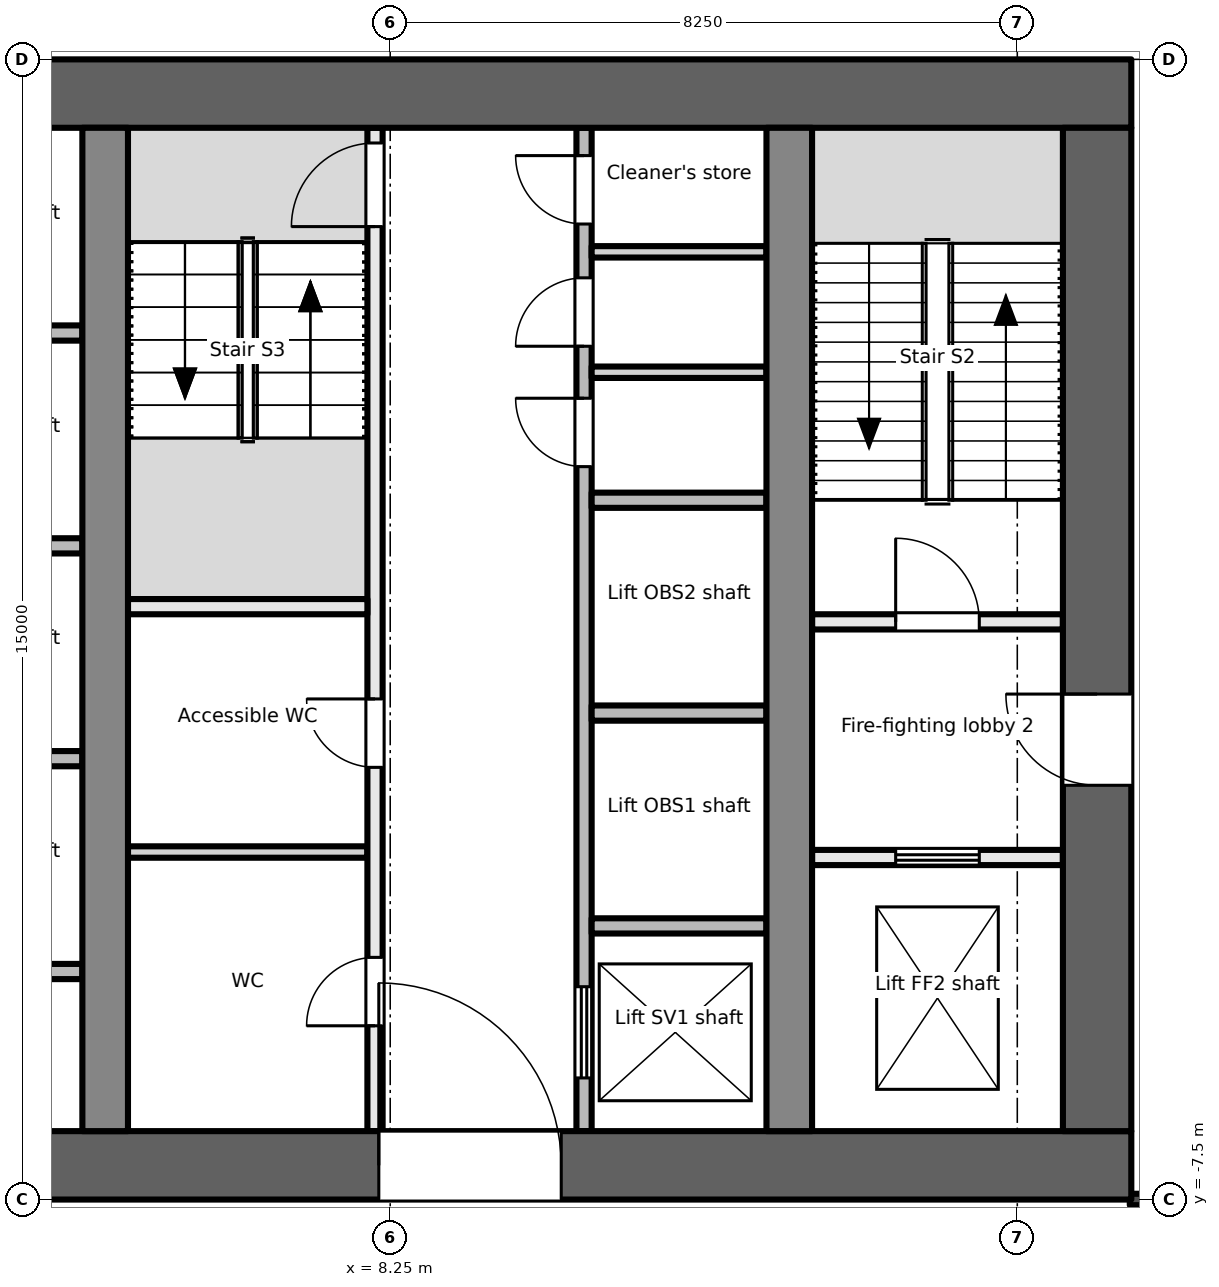
"""IFC4 building model, lengths in metres.
Left out: names, types, materials, properties, quantities, classifications, styles, units other than length and angle.
Written with IfcOpenShell. Run it as: python <this file> out.ifc"""

import sys

from ifc_helpers import new_model, si_unit, direction, frame, frame_2d, origin, place, context, subcontext, project, spatial, rectangle, extrude, element, fill, save


model = new_model("IFC4")
c1 = context("Model", 3, precision=1e-05, world=origin(), true_north=direction((0.0, 1.0)))
c2 = subcontext(c1, "Body", "Model", "MODEL_VIEW")
j1 = project(units=[si_unit("LENGTHUNIT", "METRE"), si_unit("PLANEANGLEUNIT", "RADIAN")], contexts=[c1])
p1 = place(None, origin())
s1 = spatial("IfcSite", under=j1, at=p1, CompositionType="ELEMENT")
p2 = place(p1, origin())
s2 = spatial("IfcBuilding", under=s1, at=p2, CompositionType="ELEMENT")
p3 = place(p2, frame((0.0, 0.0, 115.7)))
s3 = spatial("IfcBuildingStorey", under=s2, at=p3, CompositionType="ELEMENT", Elevation=115.7)
p4 = place(p3, frame((-18.0, -7.05, -0.2), z_axis=(0.0, 0.0, 1.0), x_axis=(1.0, 0.0, 0.0)))
e1 = element("IfcWall", 1, at=p4, inside=s3, PredefinedType="SHEAR", context=c2, shape_type="SweptSolid", body=[
    extrude(rectangle(XDim=36.0, YDim=0.9, at=frame_2d((18.0, 0.0))), origin(), (0.0, 0.0, 1.0), 5.0),
])
p5 = place(p4, frame((7.8, 0.0, 0.2)))
e2 = element("IfcOpeningElement", 2, at=p5, cuts=e1, PredefinedType="OPENING", context=c2, shape_type="SweptSolid", body=[
    extrude(rectangle(XDim=2.4, YDim=2.1, at=frame_2d((1.2, 1.05))), frame((0.0, 0.46, 0.0), z_axis=(0.0, -1.0, 0.0), x_axis=(1.0, 0.0, 0.0)), (0.0, 0.0, 1.0), 0.921),
])
p6 = place(p4, frame((17.4, 0.0, 0.2)))
e3 = element("IfcOpeningElement", 3, at=p6, cuts=e1, PredefinedType="OPENING", context=c2, shape_type="SweptSolid", body=[
    extrude(rectangle(XDim=1.2, YDim=2.1, at=frame_2d((0.6, 1.05))), frame((0.0, 0.46, 0.0), z_axis=(0.0, -1.0, 0.0), x_axis=(1.0, 0.0, 0.0)), (0.0, 0.0, 1.0), 0.921),
])
p7 = place(p4, frame((26.1, 0.0, 0.2)))
e4 = element("IfcOpeningElement", 4, at=p7, cuts=e1, PredefinedType="OPENING", context=c2, shape_type="SweptSolid", body=[
    extrude(rectangle(XDim=2.4, YDim=2.1, at=frame_2d((1.2, 1.05))), frame((0.0, 0.46, 0.0), z_axis=(0.0, -1.0, 0.0), x_axis=(1.0, 0.0, 0.0)), (0.0, 0.0, 1.0), 0.921),
])
p8 = place(p3, frame((-18.0, 7.05, -0.2), z_axis=(0.0, 0.0, 1.0), x_axis=(1.0, 0.0, 0.0)))
e5 = element("IfcWall", 5, at=p8, inside=s3, PredefinedType="SHEAR", context=c2, shape_type="SweptSolid", body=[
    extrude(rectangle(XDim=36.0, YDim=0.9, at=frame_2d((18.0, 0.0))), origin(), (0.0, 0.0, 1.0), 5.0),
])
p9 = place(p3, frame((17.55, -6.6, -0.2), z_axis=(0.0, 0.0, 1.0), x_axis=(0.0, 1.0, 0.0)))
e6 = element("IfcWall", 6, at=p9, inside=s3, PredefinedType="SHEAR", context=c2, shape_type="SweptSolid", body=[
    extrude(rectangle(XDim=13.2, YDim=0.9, at=frame_2d((6.6, 0.0))), origin(), (0.0, 0.0, 1.0), 5.0),
])
p10 = place(p9, frame((4.55, 0.0, 0.2)))
e7 = element("IfcOpeningElement", 7, at=p10, cuts=e6, PredefinedType="OPENING", context=c2, shape_type="SweptSolid", body=[
    extrude(rectangle(XDim=1.2, YDim=2.1, at=frame_2d((0.6, 1.05))), frame((0.0, 0.46, 0.0), z_axis=(0.0, -1.0, 0.0), x_axis=(1.0, 0.0, 0.0)), (0.0, 0.0, 1.0), 0.921),
])
for number, where, z_axis, x_axis in (
    (8, (4.5, -6.6, -0.2), (0.0, 0.0, 1.0), (0.0, 1.0, 0.0)),
    (9, (13.5, -6.6, -0.2), (0.0, 0.0, 1.0), (0.0, 1.0, 0.0)),
):
    element("IfcWall", number, at=place(p3, frame(where, z_axis=z_axis, x_axis=x_axis)), inside=s3, PredefinedType="SHEAR", context=c2, shape_type="SweptSolid", body=[
        extrude(rectangle(XDim=13.2, YDim=0.6, at=frame_2d((6.6, 0.0))), origin(), (0.0, 0.0, 1.0), 5.0),
    ])
p11 = place(p3, frame((13.8, -3.0, 0.0), z_axis=(0.0, 0.0, 1.0), x_axis=(1.0, 0.0, 0.0)))
e10 = element("IfcWall", 10, at=p11, inside=s3, PredefinedType="PARTITIONING", context=c2, shape_type="SweptSolid", body=[
    extrude(rectangle(XDim=3.3, YDim=0.2, at=frame_2d((1.65, 0.0))), origin(), (0.0, 0.0, 1.0), 4.8),
])
p12 = place(p11, frame((1.1, 0.0, 0.0)))
e11 = element("IfcOpeningElement", 11, at=p12, cuts=e10, PredefinedType="OPENING", context=c2, shape_type="SweptSolid", body=[
    extrude(rectangle(XDim=1.1, YDim=2.1, at=frame_2d((0.55, 1.05))), frame((0.0, 0.111, 0.0), z_axis=(0.0, -1.0, 0.0), x_axis=(1.0, 0.0, 0.0)), (0.0, 0.0, 1.0), 0.221),
])
p13 = place(p3, frame((13.8, 0.1, 0.0), z_axis=(0.0, 0.0, 1.0), x_axis=(1.0, 0.0, 0.0)))
e12 = element("IfcWall", 12, at=p13, inside=s3, PredefinedType="PARTITIONING", context=c2, shape_type="SweptSolid", body=[
    extrude(rectangle(XDim=3.3, YDim=0.2, at=frame_2d((1.65, 0.0))), origin(), (0.0, 0.0, 1.0), 4.8),
])
p14 = place(p13, frame((1.1, 0.0, 0.0)))
e13 = element("IfcOpeningElement", 13, at=p14, cuts=e12, PredefinedType="OPENING", context=c2, shape_type="SweptSolid", body=[
    extrude(rectangle(XDim=1.1, YDim=2.1, at=frame_2d((0.55, 1.05))), frame((0.0, 0.111, 0.0), z_axis=(0.0, -1.0, 0.0), x_axis=(1.0, 0.0, 0.0)), (0.0, 0.0, 1.0), 0.221),
])
for number, where, z_axis, x_axis in (
    (14, (1.9, -1.7, 0.0), (0.0, 0.0, 1.0), (1.0, 0.0, 0.0)),
    (15, (1.9, 1.1, 0.0), (0.0, 0.0, 1.0), (1.0, 0.0, 0.0)),
    (16, (1.9, 3.9, 0.0), (0.0, 0.0, 1.0), (1.0, 0.0, 0.0)),
    (17, (1.9, -4.5, 0.0), (0.0, 0.0, 1.0), (1.0, 0.0, 0.0)),
):
    element("IfcWall", number, at=place(p3, frame(where, z_axis=z_axis, x_axis=x_axis)), inside=s3, PredefinedType="PARTITIONING", context=c2, shape_type="SweptSolid", body=[
        extrude(rectangle(XDim=2.3, YDim=0.2, at=frame_2d((1.15, 0.0))), origin(), (0.0, 0.0, 1.0), 4.8),
    ])
p15 = place(p3, frame((8.05, -6.6, 0.0), z_axis=(0.0, 0.0, 1.0), x_axis=(0.0, 1.0, 0.0)))
e18 = element("IfcWall", 18, at=p15, inside=s3, PredefinedType="PARTITIONING", context=c2, shape_type="SweptSolid", body=[
    extrude(rectangle(XDim=13.2, YDim=0.2, at=frame_2d((6.6, 0.0))), origin(), (0.0, 0.0, 1.0), 4.8),
])
p16 = place(p15, frame((1.386, 0.0, 0.0)))
e19 = element("IfcOpeningElement", 19, at=p16, cuts=e18, PredefinedType="OPENING", context=c2, shape_type="SweptSolid", body=[
    extrude(rectangle(XDim=0.9, YDim=2.1, at=frame_2d((0.45, 1.05))), frame((0.0, 0.111, 0.0), z_axis=(0.0, -1.0, 0.0), x_axis=(1.0, 0.0, 0.0)), (0.0, 0.0, 1.0), 0.221),
])
p17 = place(p15, frame((4.786, 0.0, 0.0)))
e20 = element("IfcOpeningElement", 20, at=p17, cuts=e18, PredefinedType="OPENING", context=c2, shape_type="SweptSolid", body=[
    extrude(rectangle(XDim=0.9, YDim=2.1, at=frame_2d((0.45, 1.05))), frame((0.0, 0.111, 0.0), z_axis=(0.0, -1.0, 0.0), x_axis=(1.0, 0.0, 0.0)), (0.0, 0.0, 1.0), 0.221),
])
p18 = place(p15, frame((11.9, 0.0, 0.0)))
e21 = element("IfcOpeningElement", 21, at=p18, cuts=e18, PredefinedType="OPENING", context=c2, shape_type="SweptSolid", body=[
    extrude(rectangle(XDim=1.1, YDim=2.1, at=frame_2d((0.55, 1.05))), frame((0.0, 0.111, 0.0), z_axis=(0.0, -1.0, 0.0), x_axis=(1.0, 0.0, 0.0)), (0.0, 0.0, 1.0), 0.221),
])
p19 = place(p3, frame((10.8, -6.6, 0.0), z_axis=(0.0, 0.0, 1.0), x_axis=(0.0, 1.0, 0.0)))
e22 = element("IfcWall", 22, at=p19, inside=s3, PredefinedType="PARTITIONING", context=c2, shape_type="SweptSolid", body=[
    extrude(rectangle(XDim=13.2, YDim=0.2, at=frame_2d((6.6, 0.0))), origin(), (0.0, 0.0, 1.0), 4.8),
])
p20 = place(p19, frame((0.7, 0.0, 0.0)))
e23 = element("IfcOpeningElement", 23, at=p20, cuts=e22, PredefinedType="OPENING", context=c2, shape_type="SweptSolid", body=[
    extrude(rectangle(XDim=1.2, YDim=2.1, at=frame_2d((0.6, 1.05))), frame((0.0, 0.111, 0.0), z_axis=(0.0, -1.0, 0.0), x_axis=(1.0, 0.0, 0.0)), (0.0, 0.0, 1.0), 0.221),
])
p21 = place(p19, frame((8.742, 0.0, 0.0)))
e24 = element("IfcOpeningElement", 24, at=p21, cuts=e22, PredefinedType="OPENING", context=c2, shape_type="SweptSolid", body=[
    extrude(rectangle(XDim=0.9, YDim=2.1, at=frame_2d((0.45, 1.05))), frame((0.0, 0.111, 0.0), z_axis=(0.0, -1.0, 0.0), x_axis=(1.0, 0.0, 0.0)), (0.0, 0.0, 1.0), 0.221),
])
p22 = place(p19, frame((10.326, 0.0, 0.0)))
e25 = element("IfcOpeningElement", 25, at=p22, cuts=e22, PredefinedType="OPENING", context=c2, shape_type="SweptSolid", body=[
    extrude(rectangle(XDim=0.9, YDim=2.1, at=frame_2d((0.45, 1.05))), frame((0.0, 0.111, 0.0), z_axis=(0.0, -1.0, 0.0), x_axis=(1.0, 0.0, 0.0)), (0.0, 0.0, 1.0), 0.221),
])
p23 = place(p19, frame((11.934, 0.0, 0.0)))
e26 = element("IfcOpeningElement", 26, at=p23, cuts=e22, PredefinedType="OPENING", context=c2, shape_type="SweptSolid", body=[
    extrude(rectangle(XDim=0.9, YDim=2.1, at=frame_2d((0.45, 1.05))), frame((0.0, 0.111, 0.0), z_axis=(0.0, -1.0, 0.0), x_axis=(1.0, 0.0, 0.0)), (0.0, 0.0, 1.0), 0.221),
])
p24 = place(p3, frame((4.8, 0.3, 0.0), z_axis=(0.0, 0.0, 1.0), x_axis=(1.0, 0.0, 0.0)))
e27 = element("IfcWall", 27, at=p24, inside=s3, PredefinedType="PARTITIONING", context=c2, shape_type="SweptSolid", body=[
    extrude(rectangle(XDim=3.15, YDim=0.2, at=frame_2d((1.575, 0.0))), origin(), (0.0, 0.0, 1.0), 4.8),
])
p25 = place(p3, frame((4.8, -2.928, 0.0), z_axis=(0.0, 0.0, 1.0), x_axis=(1.0, 0.0, 0.0)))
e28 = element("IfcWall", 28, at=p25, inside=s3, PredefinedType="PARTITIONING", context=c2, shape_type="SweptSolid", body=[
    extrude(rectangle(XDim=3.15, YDim=0.15, at=frame_2d((1.575, 0.0))), origin(), (0.0, 0.0, 1.0), 4.8),
])
for number, where, z_axis, x_axis in (
    (29, (10.9, -3.9, 0.0), (0.0, 0.0, 1.0), (1.0, 0.0, 0.0)),
    (30, (10.9, -1.1, 0.0), (0.0, 0.0, 1.0), (1.0, 0.0, 0.0)),
    (31, (10.9, 1.7, 0.0), (0.0, 0.0, 1.0), (1.0, 0.0, 0.0)),
):
    element("IfcWall", number, at=place(p3, frame(where, z_axis=z_axis, x_axis=x_axis)), inside=s3, PredefinedType="PARTITIONING", context=c2, shape_type="SweptSolid", body=[
        extrude(rectangle(XDim=2.3, YDim=0.2, at=frame_2d((1.15, 0.0))), origin(), (0.0, 0.0, 1.0), 4.8),
    ])
for number, where, z_axis, x_axis in (
    (32, (10.9, 3.384, 0.0), (0.0, 0.0, 1.0), (1.0, 0.0, 0.0)),
    (33, (10.9, 4.968, 0.0), (0.0, 0.0, 1.0), (1.0, 0.0, 0.0)),
):
    element("IfcWall", number, at=place(p3, frame(where, z_axis=z_axis, x_axis=x_axis)), inside=s3, PredefinedType="PARTITIONING", context=c2, shape_type="SweptSolid", body=[
        extrude(rectangle(XDim=2.3, YDim=0.15, at=frame_2d((1.15, 0.0))), origin(), (0.0, 0.0, 1.0), 4.8),
    ])
p26 = place(p3, frame((17.98, -7.499, 0.0), z_axis=(0.0, 0.0, 1.0), x_axis=(1.0, 0.0, 0.0)))
e34 = element("IfcWall", 34, at=p26, inside=s3, PredefinedType="PARTITIONING", context=c2, shape_type="SweptSolid", body=[
    extrude(rectangle(XDim=2.296, YDim=0.15, at=frame_2d((1.148, 0.0))), origin(), (0.0, 0.0, 1.0), 2.35),
])
p27 = place(p26, frame((0.648, 0.0, 0.0)))
e35 = element("IfcOpeningElement", 35, at=p27, cuts=e34, PredefinedType="OPENING", context=c2, shape_type="SweptSolid", body=[
    extrude(rectangle(XDim=1.0, YDim=2.1, at=frame_2d((0.5, 1.05))), frame((0.0, 0.085, 0.0), z_axis=(0.0, -1.0, 0.0), x_axis=(1.0, 0.0, 0.0)), (0.0, 0.0, 1.0), 0.171),
])
p28 = place(p12, origin())
e36 = element("IfcDoor", 36, at=p28, inside=s3, OperationType="DOUBLE_DOOR_SLIDING", PredefinedType="DOOR", context=c2, shape_type="SweptSolid", body=[
    extrude(rectangle(XDim=1.1, YDim=2.1, at=frame_2d((0.55, 1.05))), frame((0.0, 0.025, 0.0), z_axis=(0.0, -1.0, 0.0), x_axis=(1.0, 0.0, 0.0)), (0.0, 0.0, 1.0), 0.05),
])
fill(e11, e36)
p29 = place(p10, origin())
e37 = element("IfcDoor", 37, at=p29, inside=s3, OperationType="SINGLE_SWING_RIGHT", PredefinedType="DOOR", context=c2, shape_type="SweptSolid", body=[
    extrude(rectangle(XDim=1.2, YDim=2.1, at=frame_2d((0.6, 1.05))), frame((0.0, 0.025, 0.0), z_axis=(0.0, -1.0, 0.0), x_axis=(1.0, 0.0, 0.0)), (0.0, 0.0, 1.0), 0.05),
])
fill(e7, e37)
p30 = place(p14, origin())
e38 = element("IfcDoor", 38, at=p30, inside=s3, OperationType="SINGLE_SWING_LEFT", PredefinedType="DOOR", context=c2, shape_type="SweptSolid", body=[
    extrude(rectangle(XDim=1.1, YDim=2.1, at=frame_2d((0.55, 1.05))), frame((0.0, 0.025, 0.0), z_axis=(0.0, -1.0, 0.0), x_axis=(1.0, 0.0, 0.0)), (0.0, 0.0, 1.0), 0.05),
])
fill(e13, e38)
p31 = place(p16, origin())
e39 = element("IfcDoor", 39, at=p31, inside=s3, OperationType="SINGLE_SWING_LEFT", PredefinedType="DOOR", context=c2, shape_type="SweptSolid", body=[
    extrude(rectangle(XDim=0.9, YDim=2.1, at=frame_2d((0.45, 1.05))), frame((0.0, 0.025, 0.0), z_axis=(0.0, -1.0, 0.0), x_axis=(1.0, 0.0, 0.0)), (0.0, 0.0, 1.0), 0.05),
])
fill(e19, e39)
p32 = place(p17, origin())
e40 = element("IfcDoor", 40, at=p32, inside=s3, OperationType="SINGLE_SWING_RIGHT", PredefinedType="DOOR", context=c2, shape_type="SweptSolid", body=[
    extrude(rectangle(XDim=0.9, YDim=2.1, at=frame_2d((0.45, 1.05))), frame((0.0, 0.025, 0.0), z_axis=(0.0, -1.0, 0.0), x_axis=(1.0, 0.0, 0.0)), (0.0, 0.0, 1.0), 0.05),
])
fill(e20, e40)
p33 = place(p18, origin())
e41 = element("IfcDoor", 41, at=p33, inside=s3, OperationType="SINGLE_SWING_LEFT", PredefinedType="DOOR", context=c2, shape_type="SweptSolid", body=[
    extrude(rectangle(XDim=1.1, YDim=2.1, at=frame_2d((0.55, 1.05))), frame((0.0, 0.025, 0.0), z_axis=(0.0, -1.0, 0.0), x_axis=(1.0, 0.0, 0.0)), (0.0, 0.0, 1.0), 0.05),
])
fill(e21, e41)
p34 = place(p7, origin())
e42 = element("IfcDoor", 42, at=p34, inside=s3, OperationType="DOUBLE_DOOR_DOUBLE_SWING", PredefinedType="DOOR", context=c2, shape_type="SweptSolid", body=[
    extrude(rectangle(XDim=2.4, YDim=2.1, at=frame_2d((1.2, 1.05))), frame((0.0, 0.025, 0.0), z_axis=(0.0, -1.0, 0.0), x_axis=(1.0, 0.0, 0.0)), (0.0, 0.0, 1.0), 0.05),
])
fill(e4, e42)
p35 = place(p20, origin())
e43 = element("IfcDoor", 43, at=p35, inside=s3, OperationType="DOUBLE_DOOR_SLIDING", PredefinedType="DOOR", context=c2, shape_type="SweptSolid", body=[
    extrude(rectangle(XDim=1.2, YDim=2.1, at=frame_2d((0.6, 1.05))), frame((0.0, 0.025, 0.0), z_axis=(0.0, -1.0, 0.0), x_axis=(1.0, 0.0, 0.0)), (0.0, 0.0, 1.0), 0.05),
])
fill(e23, e43)
p36 = place(p21, origin())
e44 = element("IfcDoor", 44, at=p36, inside=s3, OperationType="SINGLE_SWING_RIGHT", PredefinedType="DOOR", context=c2, shape_type="SweptSolid", body=[
    extrude(rectangle(XDim=0.9, YDim=2.1, at=frame_2d((0.45, 1.05))), frame((0.0, 0.025, 0.0), z_axis=(0.0, -1.0, 0.0), x_axis=(1.0, 0.0, 0.0)), (0.0, 0.0, 1.0), 0.05),
])
fill(e24, e44)
p37 = place(p22, origin())
e45 = element("IfcDoor", 45, at=p37, inside=s3, OperationType="SINGLE_SWING_LEFT", PredefinedType="DOOR", context=c2, shape_type="SweptSolid", body=[
    extrude(rectangle(XDim=0.9, YDim=2.1, at=frame_2d((0.45, 1.05))), frame((0.0, 0.025, 0.0), z_axis=(0.0, -1.0, 0.0), x_axis=(1.0, 0.0, 0.0)), (0.0, 0.0, 1.0), 0.05),
])
fill(e25, e45)
p38 = place(p23, origin())
e46 = element("IfcDoor", 46, at=p38, inside=s3, OperationType="SINGLE_SWING_RIGHT", PredefinedType="DOOR", context=c2, shape_type="SweptSolid", body=[
    extrude(rectangle(XDim=0.9, YDim=2.1, at=frame_2d((0.45, 1.05))), frame((0.0, 0.025, 0.0), z_axis=(0.0, -1.0, 0.0), x_axis=(1.0, 0.0, 0.0)), (0.0, 0.0, 1.0), 0.05),
])
fill(e26, e46)
save(model, sys.argv[1])
